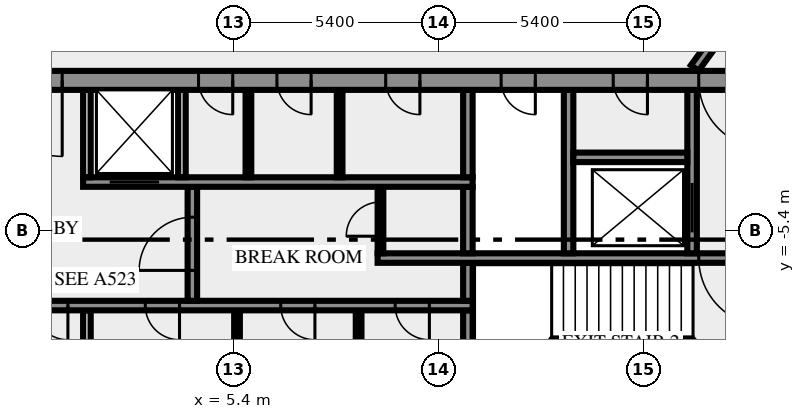
"""IFC4 building model, lengths in metres.
Left out: names, types, materials, properties, quantities, classifications, styles, units other than length and angle.
Written with IfcOpenShell. Run it as: python <this file> out.ifc"""

import sys

from ifc_helpers import new_model, si_unit, direction, frame, frame_2d, origin, place, context, subcontext, project, spatial, rectangle, extrude, element, fill, save


model = new_model("IFC4")
c1 = context("Model", 3, precision=1e-05, world=origin(), true_north=direction((0.0, 1.0)))
c2 = subcontext(c1, "Body", "Model", "MODEL_VIEW")
j1 = project(units=[si_unit("LENGTHUNIT", "METRE"), si_unit("PLANEANGLEUNIT", "RADIAN")], contexts=[c1])
p1 = place(None, origin())
s1 = spatial("IfcSite", under=j1, at=p1, CompositionType="ELEMENT")
p2 = place(p1, origin())
s2 = spatial("IfcBuilding", under=s1, at=p2, CompositionType="ELEMENT")
p3 = place(p2, frame((0.0, 0.0, 331.0)))
s3 = spatial("IfcBuildingStorey", under=s2, at=p3, CompositionType="ELEMENT", Elevation=331.0)
p4 = place(p3, frame((1.55, -10.5, 0.0), z_axis=(0.0, 0.0, 1.0), x_axis=(0.0, 1.0, 0.0)))
e1 = element("IfcWall", 1, at=p4, inside=s3, PredefinedType="SOLIDWALL", context=c2, shape_type="SweptSolid", body=[
    extrude(rectangle(XDim=3.0, YDim=0.2, at=frame_2d((1.5, 0.0))), origin(), (0.0, 0.0, 1.0), 3.65),
])
for number, where, z_axis, x_axis in (
    (2, (5.5, -10.5, 0.0), (0.0, 0.0, 1.0), (0.0, 1.0, 0.0)),
    (3, (8.7, -10.5, 0.0), (0.0, 0.0, 1.0), (0.0, 1.0, 0.0)),
):
    element("IfcWall", number, at=place(p3, frame(where, z_axis=z_axis, x_axis=x_axis)), inside=s3, PredefinedType="PARTITIONING", context=c2, shape_type="SweptSolid", body=[
        extrude(rectangle(XDim=3.0, YDim=0.15, at=frame_2d((1.5, 0.0))), origin(), (0.0, 0.0, 1.0), 3.65),
    ])
p5 = place(p3, frame((11.575, -10.5, 0.0), z_axis=(0.0, 0.0, 1.0), x_axis=(0.0, 1.0, 0.0)))
e4 = element("IfcWall", 4, at=p5, inside=s3, PredefinedType="SHEAR", context=c2, shape_type="SweptSolid", body=[
    extrude(rectangle(XDim=3.0, YDim=0.25, at=frame_2d((1.5, 0.0))), origin(), (0.0, 0.0, 1.0), 3.65),
])
p6 = place(p3, frame((11.7, -7.375, 0.0), z_axis=(0.0, 0.0, 1.0), x_axis=(-1.0, 0.0, 0.0)))
e5 = element("IfcWall", 5, at=p6, inside=s3, PredefinedType="SHEAR", context=c2, shape_type="SweptSolid", body=[
    extrude(rectangle(XDim=23.4, YDim=0.25, at=frame_2d((11.7, 0.0))), origin(), (0.0, 0.0, 1.0), 3.65),
])
p7 = place(p6, frame((22.225, 0.0, 0.0)))
e6 = element("IfcOpeningElement", 6, at=p7, cuts=e5, PredefinedType="OPENING", context=c2, shape_type="SweptSolid", body=[
    extrude(rectangle(XDim=0.8, YDim=2.1, at=frame_2d((0.4, 1.05))), frame((0.0, 0.135, 0.0), z_axis=(0.0, -1.0, 0.0), x_axis=(1.0, 0.0, 0.0)), (0.0, 0.0, 1.0), 0.27),
])
p8 = place(p6, frame((20.2, 0.0, 0.0)))
e7 = element("IfcOpeningElement", 7, at=p8, cuts=e5, PredefinedType="OPENING", context=c2, shape_type="SweptSolid", body=[
    extrude(rectangle(XDim=1.1, YDim=2.1, at=frame_2d((0.55, 1.05))), frame((0.0, 0.135, 0.0), z_axis=(0.0, -1.0, 0.0), x_axis=(1.0, 0.0, 0.0)), (0.0, 0.0, 1.0), 0.27),
])
p9 = place(p6, frame((17.7, 0.0, 0.0)))
e8 = element("IfcOpeningElement", 8, at=p9, cuts=e5, PredefinedType="OPENING", context=c2, shape_type="SweptSolid", body=[
    extrude(rectangle(XDim=1.1, YDim=2.1, at=frame_2d((0.55, 1.05))), frame((0.0, 0.135, 0.0), z_axis=(0.0, -1.0, 0.0), x_axis=(1.0, 0.0, 0.0)), (0.0, 0.0, 1.0), 0.27),
])
p10 = place(p6, frame((15.975, 0.0, 0.0)))
e9 = element("IfcOpeningElement", 9, at=p10, cuts=e5, PredefinedType="OPENING", context=c2, shape_type="SweptSolid", body=[
    extrude(rectangle(XDim=0.8, YDim=2.1, at=frame_2d((0.4, 1.05))), frame((0.0, 0.135, 0.0), z_axis=(0.0, -1.0, 0.0), x_axis=(1.0, 0.0, 0.0)), (0.0, 0.0, 1.0), 0.27),
])
p11 = place(p6, frame((14.2, 0.0, 0.0)))
e10 = element("IfcOpeningElement", 10, at=p11, cuts=e5, PredefinedType="OPENING", context=c2, shape_type="SweptSolid", body=[
    extrude(rectangle(XDim=0.9, YDim=2.1, at=frame_2d((0.45, 1.05))), frame((0.0, 0.135, 0.0), z_axis=(0.0, -1.0, 0.0), x_axis=(1.0, 0.0, 0.0)), (0.0, 0.0, 1.0), 0.27),
])
p12 = place(p6, frame((12.35, 0.0, 0.0)))
e11 = element("IfcOpeningElement", 11, at=p12, cuts=e5, PredefinedType="OPENING", context=c2, shape_type="SweptSolid", body=[
    extrude(rectangle(XDim=0.9, YDim=2.1, at=frame_2d((0.45, 1.05))), frame((0.0, 0.135, 0.0), z_axis=(0.0, -1.0, 0.0), x_axis=(1.0, 0.0, 0.0)), (0.0, 0.0, 1.0), 0.27),
])
p13 = place(p6, frame((10.65, 0.0, 0.0)))
e12 = element("IfcOpeningElement", 12, at=p13, cuts=e5, PredefinedType="OPENING", context=c2, shape_type="SweptSolid", body=[
    extrude(rectangle(XDim=0.9, YDim=2.1, at=frame_2d((0.45, 1.05))), frame((0.0, 0.135, 0.0), z_axis=(0.0, -1.0, 0.0), x_axis=(1.0, 0.0, 0.0)), (0.0, 0.0, 1.0), 0.27),
])
p14 = place(p6, frame((7.713, 0.0, 0.0)))
e13 = element("IfcOpeningElement", 13, at=p14, cuts=e5, PredefinedType="OPENING", context=c2, shape_type="SweptSolid", body=[
    extrude(rectangle(XDim=0.9, YDim=2.1, at=frame_2d((0.45, 1.05))), frame((0.0, 0.135, 0.0), z_axis=(0.0, -1.0, 0.0), x_axis=(1.0, 0.0, 0.0)), (0.0, 0.0, 1.0), 0.27),
])
p15 = place(p6, frame((4.15, 0.0, 0.0)))
e14 = element("IfcOpeningElement", 14, at=p15, cuts=e5, PredefinedType="OPENING", context=c2, shape_type="SweptSolid", body=[
    extrude(rectangle(XDim=0.9, YDim=2.1, at=frame_2d((0.45, 1.05))), frame((0.0, 0.135, 0.0), z_axis=(0.0, -1.0, 0.0), x_axis=(1.0, 0.0, 0.0)), (0.0, 0.0, 1.0), 0.27),
])
p16 = place(p6, frame((1.138, 0.0, 0.0)))
e15 = element("IfcOpeningElement", 15, at=p16, cuts=e5, PredefinedType="OPENING", context=c2, shape_type="SweptSolid", body=[
    extrude(rectangle(XDim=0.9, YDim=2.1, at=frame_2d((0.45, 1.05))), frame((0.0, 0.135, 0.0), z_axis=(0.0, -1.0, 0.0), x_axis=(1.0, 0.0, 0.0)), (0.0, 0.0, 1.0), 0.27),
])
p17 = place(p3, frame((4.325, -7.25, 0.0), z_axis=(0.0, 0.0, 1.0), x_axis=(0.0, 1.0, 0.0)))
e16 = element("IfcWall", 16, at=p17, inside=s3, PredefinedType="SHEAR", context=c2, shape_type="SweptSolid", body=[
    extrude(rectangle(XDim=3.0, YDim=0.25, at=frame_2d((1.5, 0.0))), origin(), (0.0, 0.0, 1.0), 3.65),
])
p18 = place(p17, frame((0.8, 0.0, 0.0)))
e17 = element("IfcOpeningElement", 17, at=p18, cuts=e16, PredefinedType="OPENING", context=c2, shape_type="SweptSolid", body=[
    extrude(rectangle(XDim=1.4, YDim=2.1, at=frame_2d((0.7, 1.05))), frame((0.0, 0.135, 0.0), z_axis=(0.0, -1.0, 0.0), x_axis=(1.0, 0.0, 0.0)), (0.0, 0.0, 1.0), 0.27),
])
p19 = place(p3, frame((11.575, -7.25, 0.0), z_axis=(0.0, 0.0, 1.0), x_axis=(0.0, 1.0, 0.0)))
e18 = element("IfcWall", 18, at=p19, inside=s3, PredefinedType="SHEAR", context=c2, shape_type="SweptSolid", body=[
    extrude(rectangle(XDim=1.0, YDim=0.25, at=frame_2d((0.5, 0.0))), origin(), (0.0, 0.0, 1.0), 3.65),
])
p20 = place(p3, frame((20.0, -6.125, 0.0), z_axis=(0.0, 0.0, 1.0), x_axis=(-1.0, 0.0, 0.0)))
e19 = element("IfcWall", 19, at=p20, inside=s3, PredefinedType="SHEAR", context=c2, shape_type="SweptSolid", body=[
    extrude(rectangle(XDim=10.8, YDim=0.25, at=frame_2d((5.4, 0.0))), origin(), (0.0, 0.0, 1.0), 3.65),
])
p21 = place(p20, frame((0.55, 0.0, 0.0)))
e20 = element("IfcOpeningElement", 20, at=p21, cuts=e19, PredefinedType="OPENING", context=c2, shape_type="SweptSolid", body=[
    extrude(rectangle(XDim=1.8, YDim=2.1, at=frame_2d((0.9, 1.05))), frame((0.0, 0.135, 0.0), z_axis=(0.0, -1.0, 0.0), x_axis=(1.0, 0.0, 0.0)), (0.0, 0.0, 1.0), 0.27),
])
p22 = place(p3, frame((9.275, -6.0, 0.0), z_axis=(0.0, 0.0, 1.0), x_axis=(0.0, 1.0, 0.0)))
e21 = element("IfcWall", 21, at=p22, inside=s3, PredefinedType="PARTITIONING", context=c2, shape_type="SweptSolid", body=[
    extrude(rectangle(XDim=1.75, YDim=0.15, at=frame_2d((0.875, 0.0))), origin(), (0.0, 0.0, 1.0), 3.65),
])
p23 = place(p22, frame((0.45, 0.0, 0.0)))
e22 = element("IfcOpeningElement", 22, at=p23, cuts=e21, PredefinedType="OPENING", context=c2, shape_type="SweptSolid", body=[
    extrude(rectangle(XDim=0.9, YDim=2.1, at=frame_2d((0.45, 1.05))), frame((0.0, 0.085, 0.0), z_axis=(0.0, -1.0, 0.0), x_axis=(1.0, 0.0, 0.0)), (0.0, 0.0, 1.0), 0.17),
])
p24 = place(p3, frame((11.575, -6.0, 0.0), z_axis=(0.0, 0.0, 1.0), x_axis=(0.0, 1.0, 0.0)))
e23 = element("IfcWall", 23, at=p24, inside=s3, PredefinedType="SHEAR", context=c2, shape_type="SweptSolid", body=[
    extrude(rectangle(XDim=1.75, YDim=0.25, at=frame_2d((0.875, 0.0))), origin(), (0.0, 0.0, 1.0), 3.65),
])
p25 = place(p3, frame((14.225, -6.0, 0.0), z_axis=(0.0, 0.0, 1.0), x_axis=(0.0, 1.0, 0.0)))
e24 = element("IfcWall", 24, at=p25, inside=s3, PredefinedType="SHEAR", context=c2, shape_type="SweptSolid", body=[
    extrude(rectangle(XDim=4.3, YDim=0.25, at=frame_2d((2.15, 0.0))), origin(), (0.0, 0.0, 1.0), 3.65),
])
p26 = place(p3, frame((17.475, -6.0, 0.0), z_axis=(0.0, 0.0, 1.0), x_axis=(0.0, 1.0, 0.0)))
e25 = element("IfcWall", 25, at=p26, inside=s3, PredefinedType="SHEAR", context=c2, shape_type="SweptSolid", body=[
    extrude(rectangle(XDim=4.3, YDim=0.25, at=frame_2d((2.15, 0.0))), origin(), (0.0, 0.0, 1.0), 3.65),
])
p27 = place(p26, frame((0.55, 0.0, 0.0)))
e26 = element("IfcOpeningElement", 26, at=p27, cuts=e25, PredefinedType="OPENING", context=c2, shape_type="SweptSolid", body=[
    extrude(rectangle(XDim=1.3, YDim=2.1, at=frame_2d((0.65, 1.05))), frame((0.0, 0.135, 0.0), z_axis=(0.0, -1.0, 0.0), x_axis=(1.0, 0.0, 0.0)), (0.0, 0.0, 1.0), 0.27),
])
p28 = place(p3, frame((1.45, -4.125, 0.0), z_axis=(0.0, 0.0, 1.0), x_axis=(1.0, 0.0, 0.0)))
e27 = element("IfcWall", 27, at=p28, inside=s3, PredefinedType="SHEAR", context=c2, shape_type="SweptSolid", body=[
    extrude(rectangle(XDim=10.25, YDim=0.25, at=frame_2d((5.125, 0.0))), origin(), (0.0, 0.0, 1.0), 3.65),
])
p29 = place(p28, frame((0.7, 0.0, 0.0)))
e28 = element("IfcOpeningElement", 28, at=p29, cuts=e27, PredefinedType="OPENING", context=c2, shape_type="SweptSolid", body=[
    extrude(rectangle(XDim=1.3, YDim=2.1, at=frame_2d((0.65, 1.05))), frame((0.0, 0.135, 0.0), z_axis=(0.0, -1.0, 0.0), x_axis=(1.0, 0.0, 0.0)), (0.0, 0.0, 1.0), 0.27),
])
for number, where, z_axis, x_axis in (
    (29, (1.55, -4.0, 0.0), (0.0, 0.0, 1.0), (0.0, 1.0, 0.0)),
    (30, (4.05, -4.0, 0.0), (0.0, 0.0, 1.0), (0.0, 1.0, 0.0)),
):
    element("IfcWall", number, at=place(p3, frame(where, z_axis=z_axis, x_axis=x_axis)), inside=s3, PredefinedType="SOLIDWALL", context=c2, shape_type="SweptSolid", body=[
        extrude(rectangle(XDim=2.3, YDim=0.2, at=frame_2d((1.15, 0.0))), origin(), (0.0, 0.0, 1.0), 3.65),
    ])
for number, where, z_axis, x_axis in (
    (31, (5.8, -4.0, 0.0), (0.0, 0.0, 1.0), (0.0, 1.0, 0.0)),
    (32, (8.2, -4.0, 0.0), (0.0, 0.0, 1.0), (0.0, 1.0, 0.0)),
):
    element("IfcWall", number, at=place(p3, frame(where, z_axis=z_axis, x_axis=x_axis)), inside=s3, PredefinedType="PARTITIONING", context=c2, shape_type="SweptSolid", body=[
        extrude(rectangle(XDim=2.3, YDim=0.15, at=frame_2d((1.15, 0.0))), origin(), (0.0, 0.0, 1.0), 3.65),
    ])
p30 = place(p3, frame((11.575, -4.0, 0.0), z_axis=(0.0, 0.0, 1.0), x_axis=(0.0, 1.0, 0.0)))
e33 = element("IfcWall", 33, at=p30, inside=s3, PredefinedType="SHEAR", context=c2, shape_type="SweptSolid", body=[
    extrude(rectangle(XDim=2.3, YDim=0.25, at=frame_2d((1.15, 0.0))), origin(), (0.0, 0.0, 1.0), 3.65),
])
p31 = place(p3, frame((14.35, -3.475, 0.0), z_axis=(0.0, 0.0, 1.0), x_axis=(1.0, 0.0, 0.0)))
e34 = element("IfcWall", 34, at=p31, inside=s3, PredefinedType="SHEAR", context=c2, shape_type="SweptSolid", body=[
    extrude(rectangle(XDim=3.0, YDim=0.25, at=frame_2d((1.5, 0.0))), origin(), (0.0, 0.0, 1.0), 3.65),
])
p32 = place(p3, frame((20.49, -1.45, 0.0), z_axis=(0.0, 0.0, 1.0), x_axis=(-1.0, 0.0, 0.0)))
e35 = element("IfcWall", 35, at=p32, inside=s3, PredefinedType="SHEAR", context=c2, shape_type="SweptSolid", body=[
    extrude(rectangle(XDim=40.98, YDim=0.5, at=frame_2d((20.49, 0.0))), origin(), (0.0, 0.0, 1.0), 3.65),
])
p33 = place(p32, frame((38.14, 0.0, 0.0)))
e36 = element("IfcOpeningElement", 36, at=p33, cuts=e35, PredefinedType="OPENING", context=c2, shape_type="SweptSolid", body=[
    extrude(rectangle(XDim=1.8, YDim=2.1, at=frame_2d((0.9, 1.05))), frame((0.0, 0.26, 0.0), z_axis=(0.0, -1.0, 0.0), x_axis=(1.0, 0.0, 0.0)), (0.0, 0.0, 1.0), 0.52),
])
p34 = place(p32, frame((36.728, 0.0, 0.0)))
e37 = element("IfcOpeningElement", 37, at=p34, cuts=e35, PredefinedType="OPENING", context=c2, shape_type="SweptSolid", body=[
    extrude(rectangle(XDim=0.8, YDim=2.1, at=frame_2d((0.4, 1.05))), frame((0.0, 0.26, 0.0), z_axis=(0.0, -1.0, 0.0), x_axis=(1.0, 0.0, 0.0)), (0.0, 0.0, 1.0), 0.52),
])
p35 = place(p32, frame((35.153, 0.0, 0.0)))
e38 = element("IfcOpeningElement", 38, at=p35, cuts=e35, PredefinedType="OPENING", context=c2, shape_type="SweptSolid", body=[
    extrude(rectangle(XDim=0.8, YDim=2.1, at=frame_2d((0.4, 1.05))), frame((0.0, 0.26, 0.0), z_axis=(0.0, -1.0, 0.0), x_axis=(1.0, 0.0, 0.0)), (0.0, 0.0, 1.0), 0.52),
])
p36 = place(p32, frame((32.94, 0.0, 0.0)))
e39 = element("IfcOpeningElement", 39, at=p36, cuts=e35, PredefinedType="OPENING", context=c2, shape_type="SweptSolid", body=[
    extrude(rectangle(XDim=0.9, YDim=2.1, at=frame_2d((0.45, 1.05))), frame((0.0, 0.26, 0.0), z_axis=(0.0, -1.0, 0.0), x_axis=(1.0, 0.0, 0.0)), (0.0, 0.0, 1.0), 0.52),
])
p37 = place(p32, frame((31.015, 0.0, 0.0)))
e40 = element("IfcOpeningElement", 40, at=p37, cuts=e35, PredefinedType="OPENING", context=c2, shape_type="SweptSolid", body=[
    extrude(rectangle(XDim=0.8, YDim=2.1, at=frame_2d((0.4, 1.05))), frame((0.0, 0.26, 0.0), z_axis=(0.0, -1.0, 0.0), x_axis=(1.0, 0.0, 0.0)), (0.0, 0.0, 1.0), 0.52),
])
p38 = place(p32, frame((24.765, 0.0, 0.0)))
e41 = element("IfcOpeningElement", 41, at=p38, cuts=e35, PredefinedType="OPENING", context=c2, shape_type="SweptSolid", body=[
    extrude(rectangle(XDim=0.8, YDim=2.1, at=frame_2d((0.4, 1.05))), frame((0.0, 0.26, 0.0), z_axis=(0.0, -1.0, 0.0), x_axis=(1.0, 0.0, 0.0)), (0.0, 0.0, 1.0), 0.52),
])
p39 = place(p32, frame((19.59, 0.0, 0.0)))
e42 = element("IfcOpeningElement", 42, at=p39, cuts=e35, PredefinedType="OPENING", context=c2, shape_type="SweptSolid", body=[
    extrude(rectangle(XDim=2.0, YDim=2.1, at=frame_2d((1.0, 1.05))), frame((0.0, 0.26, 0.0), z_axis=(0.0, -1.0, 0.0), x_axis=(1.0, 0.0, 0.0)), (0.0, 0.0, 1.0), 0.52),
])
p40 = place(p32, frame((15.103, 0.0, 0.0)))
e43 = element("IfcOpeningElement", 43, at=p40, cuts=e35, PredefinedType="OPENING", context=c2, shape_type="SweptSolid", body=[
    extrude(rectangle(XDim=0.9, YDim=2.1, at=frame_2d((0.45, 1.05))), frame((0.0, 0.26, 0.0), z_axis=(0.0, -1.0, 0.0), x_axis=(1.0, 0.0, 0.0)), (0.0, 0.0, 1.0), 0.52),
])
p41 = place(p32, frame((13.04, 0.0, 0.0)))
e44 = element("IfcOpeningElement", 44, at=p41, cuts=e35, PredefinedType="OPENING", context=c2, shape_type="SweptSolid", body=[
    extrude(rectangle(XDim=0.9, YDim=2.1, at=frame_2d((0.45, 1.05))), frame((0.0, 0.26, 0.0), z_axis=(0.0, -1.0, 0.0), x_axis=(1.0, 0.0, 0.0)), (0.0, 0.0, 1.0), 0.52),
])
p42 = place(p32, frame((10.177, 0.0, 0.0)))
e45 = element("IfcOpeningElement", 45, at=p42, cuts=e35, PredefinedType="OPENING", context=c2, shape_type="SweptSolid", body=[
    extrude(rectangle(XDim=0.9, YDim=2.1, at=frame_2d((0.45, 1.05))), frame((0.0, 0.26, 0.0), z_axis=(0.0, -1.0, 0.0), x_axis=(1.0, 0.0, 0.0)), (0.0, 0.0, 1.0), 0.52),
])
p43 = place(p32, frame((7.14, 0.0, 0.0)))
e46 = element("IfcOpeningElement", 46, at=p43, cuts=e35, PredefinedType="OPENING", context=c2, shape_type="SweptSolid", body=[
    extrude(rectangle(XDim=0.9, YDim=2.1, at=frame_2d((0.45, 1.05))), frame((0.0, 0.26, 0.0), z_axis=(0.0, -1.0, 0.0), x_axis=(1.0, 0.0, 0.0)), (0.0, 0.0, 1.0), 0.52),
])
p44 = place(p32, frame((4.19, 0.0, 0.0)))
e47 = element("IfcOpeningElement", 47, at=p44, cuts=e35, PredefinedType="OPENING", context=c2, shape_type="SweptSolid", body=[
    extrude(rectangle(XDim=0.9, YDim=2.1, at=frame_2d((0.45, 1.05))), frame((0.0, 0.26, 0.0), z_axis=(0.0, -1.0, 0.0), x_axis=(1.0, 0.0, 0.0)), (0.0, 0.0, 1.0), 0.52),
])
p45 = place(p32, frame((1.04, 0.0, 0.0)))
e48 = element("IfcOpeningElement", 48, at=p45, cuts=e35, PredefinedType="OPENING", context=c2, shape_type="SweptSolid", body=[
    extrude(rectangle(XDim=1.8, YDim=2.1, at=frame_2d((0.9, 1.05))), frame((0.0, 0.26, 0.0), z_axis=(0.0, -1.0, 0.0), x_axis=(1.0, 0.0, 0.0)), (0.0, 0.0, 1.0), 0.52),
])
p46 = place(p3, frame((17.545, -1.125, 0.0), z_axis=(0.0, 0.0, 1.0), x_axis=(0.58779555165, 0.809009511354, 0.0)))
e49 = element("IfcWall", 49, at=p46, inside=s3, PredefinedType="SOLIDWALL", context=c2, shape_type="SweptSolid", body=[
    extrude(rectangle(XDim=18.103, YDim=0.25, at=frame_2d((9.052, 0.0))), origin(), (0.0, 0.0, 1.0), 3.65),
])
p47 = place(p46, frame((16.728, 0.0, 0.0)))
e50 = element("IfcOpeningElement", 50, at=p47, cuts=e49, PredefinedType="OPENING", context=c2, shape_type="SweptSolid", body=[
    extrude(rectangle(XDim=0.9, YDim=2.1, at=frame_2d((0.45, 1.05))), frame((0.0, 0.135, 0.0), z_axis=(0.0, -1.0, 0.0), x_axis=(1.0, 0.0, 0.0)), (0.0, 0.0, 1.0), 0.27),
])
p48 = place(p13, origin())
e51 = element("IfcDoor", 51, at=p48, inside=s3, OperationType="SINGLE_SWING_LEFT", PredefinedType="DOOR", context=c2, shape_type="SweptSolid", body=[
    extrude(rectangle(XDim=0.9, YDim=2.1, at=frame_2d((0.45, 1.05))), frame((0.0, 0.025, 0.0), z_axis=(0.0, -1.0, 0.0), x_axis=(1.0, 0.0, 0.0)), (0.0, 0.0, 1.0), 0.05),
])
fill(e12, e51)
p49 = place(p14, origin())
e52 = element("IfcDoor", 52, at=p49, inside=s3, OperationType="SINGLE_SWING_LEFT", PredefinedType="DOOR", context=c2, shape_type="SweptSolid", body=[
    extrude(rectangle(XDim=0.9, YDim=2.1, at=frame_2d((0.45, 1.05))), frame((0.0, 0.025, 0.0), z_axis=(0.0, -1.0, 0.0), x_axis=(1.0, 0.0, 0.0)), (0.0, 0.0, 1.0), 0.05),
])
fill(e13, e52)
p50 = place(p15, origin())
e53 = element("IfcDoor", 53, at=p50, inside=s3, OperationType="SINGLE_SWING_LEFT", PredefinedType="DOOR", context=c2, shape_type="SweptSolid", body=[
    extrude(rectangle(XDim=0.9, YDim=2.1, at=frame_2d((0.45, 1.05))), frame((0.0, 0.025, 0.0), z_axis=(0.0, -1.0, 0.0), x_axis=(1.0, 0.0, 0.0)), (0.0, 0.0, 1.0), 0.05),
])
fill(e14, e53)
p51 = place(p16, origin())
e54 = element("IfcDoor", 54, at=p51, inside=s3, OperationType="SINGLE_SWING_LEFT", PredefinedType="DOOR", context=c2, shape_type="SweptSolid", body=[
    extrude(rectangle(XDim=0.9, YDim=2.1, at=frame_2d((0.45, 1.05))), frame((0.0, 0.025, 0.0), z_axis=(0.0, -1.0, 0.0), x_axis=(1.0, 0.0, 0.0)), (0.0, 0.0, 1.0), 0.05),
])
fill(e15, e54)
p52 = place(p18, origin())
e55 = element("IfcDoor", 55, at=p52, inside=s3, OperationType="DOUBLE_DOOR_SINGLE_SWING", PredefinedType="DOOR", context=c2, shape_type="SweptSolid", body=[
    extrude(rectangle(XDim=1.4, YDim=2.1, at=frame_2d((0.7, 1.05))), frame((0.0, 0.025, 0.0), z_axis=(0.0, -1.0, 0.0), x_axis=(1.0, 0.0, 0.0)), (0.0, 0.0, 1.0), 0.05),
])
fill(e17, e55)
p53 = place(p21, origin())
e56 = element("IfcDoor", 56, at=p53, inside=s3, OperationType="DOUBLE_DOOR_SINGLE_SWING", PredefinedType="DOOR", context=c2, shape_type="SweptSolid", body=[
    extrude(rectangle(XDim=1.8, YDim=2.1, at=frame_2d((0.9, 1.05))), frame((0.0, 0.025, 0.0), z_axis=(0.0, -1.0, 0.0), x_axis=(1.0, 0.0, 0.0)), (0.0, 0.0, 1.0), 0.05),
])
fill(e20, e56)
p54 = place(p23, origin())
e57 = element("IfcDoor", 57, at=p54, inside=s3, OperationType="SINGLE_SWING_RIGHT", PredefinedType="DOOR", context=c2, shape_type="SweptSolid", body=[
    extrude(rectangle(XDim=0.9, YDim=2.1, at=frame_2d((0.45, 1.05))), frame((0.0, 0.025, 0.0), z_axis=(0.0, -1.0, 0.0), x_axis=(1.0, 0.0, 0.0)), (0.0, 0.0, 1.0), 0.05),
])
fill(e22, e57)
p55 = place(p27, origin())
e58 = element("IfcDoor", 58, at=p55, inside=s3, OperationType="DOUBLE_DOOR_SLIDING", PredefinedType="DOOR", context=c2, shape_type="SweptSolid", body=[
    extrude(rectangle(XDim=1.3, YDim=2.1, at=frame_2d((0.65, 1.05))), frame((0.0, 0.025, 0.0), z_axis=(0.0, -1.0, 0.0), x_axis=(1.0, 0.0, 0.0)), (0.0, 0.0, 1.0), 0.05),
])
fill(e26, e58)
p56 = place(p29, origin())
e59 = element("IfcDoor", 59, at=p56, inside=s3, OperationType="DOUBLE_DOOR_SLIDING", PredefinedType="DOOR", context=c2, shape_type="SweptSolid", body=[
    extrude(rectangle(XDim=1.3, YDim=2.1, at=frame_2d((0.65, 1.05))), frame((0.0, 0.025, 0.0), z_axis=(0.0, -1.0, 0.0), x_axis=(1.0, 0.0, 0.0)), (0.0, 0.0, 1.0), 0.05),
])
fill(e28, e59)
p57 = place(p39, origin())
e60 = element("IfcDoor", 60, at=p57, inside=s3, OperationType="DOUBLE_DOOR_SINGLE_SWING", PredefinedType="DOOR", context=c2, shape_type="SweptSolid", body=[
    extrude(rectangle(XDim=2.0, YDim=2.1, at=frame_2d((1.0, 1.05))), frame((0.0, 0.025, 0.0), z_axis=(0.0, -1.0, 0.0), x_axis=(1.0, 0.0, 0.0)), (0.0, 0.0, 1.0), 0.05),
])
fill(e42, e60)
p58 = place(p40, origin())
e61 = element("IfcDoor", 61, at=p58, inside=s3, OperationType="SINGLE_SWING_LEFT", PredefinedType="DOOR", context=c2, shape_type="SweptSolid", body=[
    extrude(rectangle(XDim=0.9, YDim=2.1, at=frame_2d((0.45, 1.05))), frame((0.0, 0.025, 0.0), z_axis=(0.0, -1.0, 0.0), x_axis=(1.0, 0.0, 0.0)), (0.0, 0.0, 1.0), 0.05),
])
fill(e43, e61)
p59 = place(p41, origin())
e62 = element("IfcDoor", 62, at=p59, inside=s3, OperationType="SINGLE_SWING_LEFT", PredefinedType="DOOR", context=c2, shape_type="SweptSolid", body=[
    extrude(rectangle(XDim=0.9, YDim=2.1, at=frame_2d((0.45, 1.05))), frame((0.0, 0.025, 0.0), z_axis=(0.0, -1.0, 0.0), x_axis=(1.0, 0.0, 0.0)), (0.0, 0.0, 1.0), 0.05),
])
fill(e44, e62)
p60 = place(p42, origin())
e63 = element("IfcDoor", 63, at=p60, inside=s3, OperationType="SINGLE_SWING_LEFT", PredefinedType="DOOR", context=c2, shape_type="SweptSolid", body=[
    extrude(rectangle(XDim=0.9, YDim=2.1, at=frame_2d((0.45, 1.05))), frame((0.0, 0.025, 0.0), z_axis=(0.0, -1.0, 0.0), x_axis=(1.0, 0.0, 0.0)), (0.0, 0.0, 1.0), 0.05),
])
fill(e45, e63)
p61 = place(p43, origin())
e64 = element("IfcDoor", 64, at=p61, inside=s3, OperationType="SINGLE_SWING_LEFT", PredefinedType="DOOR", context=c2, shape_type="SweptSolid", body=[
    extrude(rectangle(XDim=0.9, YDim=2.1, at=frame_2d((0.45, 1.05))), frame((0.0, 0.025, 0.0), z_axis=(0.0, -1.0, 0.0), x_axis=(1.0, 0.0, 0.0)), (0.0, 0.0, 1.0), 0.05),
])
fill(e46, e64)
p62 = place(p44, origin())
e65 = element("IfcDoor", 65, at=p62, inside=s3, OperationType="SINGLE_SWING_LEFT", PredefinedType="DOOR", context=c2, shape_type="SweptSolid", body=[
    extrude(rectangle(XDim=0.9, YDim=2.1, at=frame_2d((0.45, 1.05))), frame((0.0, 0.025, 0.0), z_axis=(0.0, -1.0, 0.0), x_axis=(1.0, 0.0, 0.0)), (0.0, 0.0, 1.0), 0.05),
])
fill(e47, e65)
p63 = place(p45, origin())
e66 = element("IfcDoor", 66, at=p63, inside=s3, OperationType="DOUBLE_DOOR_SINGLE_SWING", PredefinedType="DOOR", context=c2, shape_type="SweptSolid", body=[
    extrude(rectangle(XDim=1.8, YDim=2.1, at=frame_2d((0.9, 1.05))), frame((0.0, 0.025, 0.0), z_axis=(0.0, -1.0, 0.0), x_axis=(1.0, 0.0, 0.0)), (0.0, 0.0, 1.0), 0.05),
])
fill(e48, e66)
save(model, sys.argv[1])
